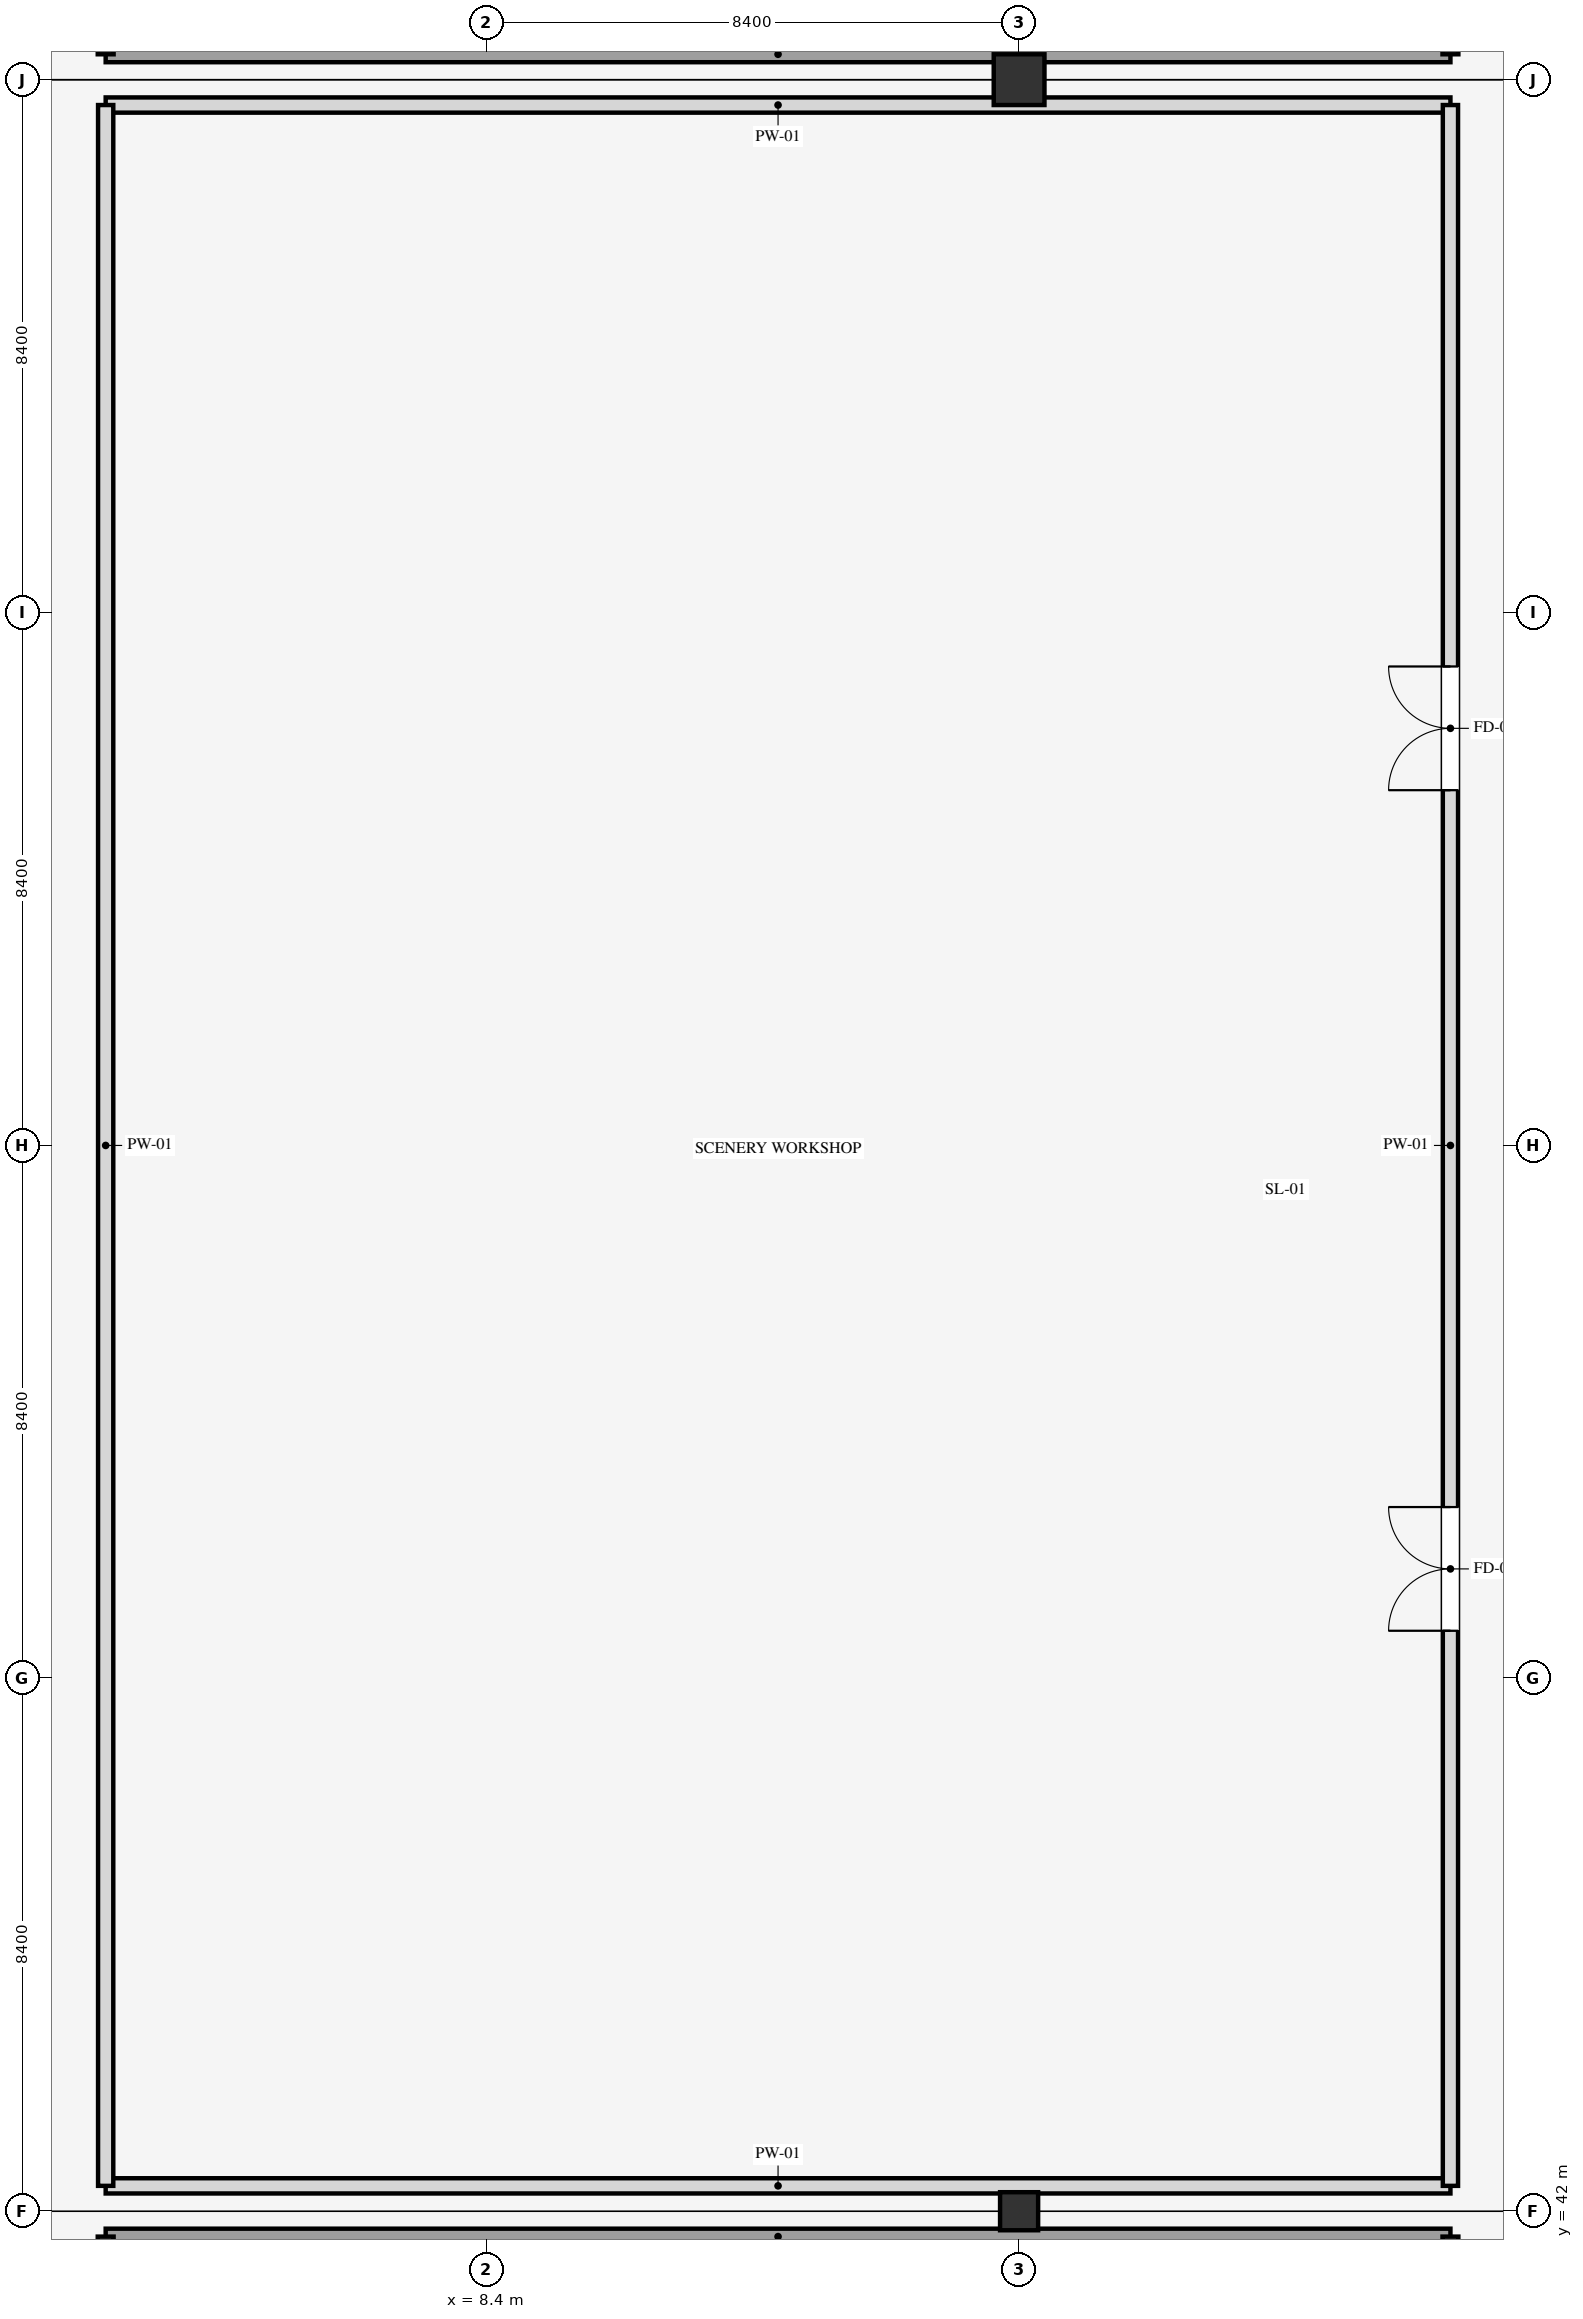
"""IFC4 building model, lengths in metres.
Left out: names, types, materials, properties, quantities, classifications, styles, units other than length and angle.
Written with IfcOpenShell. Run it as: python <this file> out.ifc"""

import sys

from ifc_helpers import new_model, si_unit, direction, frame, frame_2d, origin, origin_2d, place, context, subcontext, project, spatial, rectangle, extrude, element, fill, save


model = new_model("IFC4")
c1 = context("Model", 3, precision=1e-05, world=origin(), true_north=direction((0.0, 1.0)))
c2 = subcontext(c1, "Body", "Model", "MODEL_VIEW")
j1 = project(units=[si_unit("LENGTHUNIT", "METRE"), si_unit("PLANEANGLEUNIT", "RADIAN")], contexts=[c1])
p1 = place(None, origin())
s1 = spatial("IfcSite", under=j1, at=p1, CompositionType="ELEMENT")
p2 = place(p1, origin())
s2 = spatial("IfcBuilding", under=s1, at=p2, CompositionType="ELEMENT")
p3 = place(p2, origin())
s3 = spatial("IfcBuildingStorey", under=s2, at=p3, CompositionType="ELEMENT", Elevation=0.0)
p4 = place(p3, frame((16.8, 42.0, 0.0), z_axis=(0.0, 0.0, 1.0), x_axis=(1.0, 0.0, 0.0)))
e1 = element("IfcColumn", 1, at=p4, inside=s3, PredefinedType="COLUMN", context=c2, shape_type="SweptSolid", body=[
    extrude(rectangle(XDim=0.6, YDim=0.6, at=origin_2d()), origin(), (0.0, 0.0, 1.0), 5.4),
])
p5 = place(p3, frame((16.8, 75.6, 0.0), z_axis=(0.0, 0.0, 1.0), x_axis=(1.0, 0.0, 0.0)))
e2 = element("IfcColumn", 2, at=p5, inside=s3, PredefinedType="COLUMN", context=c2, shape_type="SweptSolid", body=[
    extrude(rectangle(XDim=0.8, YDim=0.8, at=origin_2d()), origin(), (0.0, 0.0, 1.0), 5.4),
])
for number, where, z_axis, x_axis in (
    (3, (2.4, 42.4, 0.0), (0.0, 0.0, 1.0), (1.0, 0.0, 0.0)),
    (4, (2.4, 75.2, 0.0), (0.0, 0.0, 1.0), (1.0, 0.0, 0.0)),
):
    element("IfcWall", number, at=place(p3, frame(where, z_axis=z_axis, x_axis=x_axis)), inside=s3, PredefinedType="PARTITIONING", context=c2, shape_type="SweptSolid", body=[
        extrude(rectangle(XDim=21.2, YDim=0.24, at=frame_2d((10.6, 0.0))), origin(), (0.0, 0.0, 1.0), 4.44),
    ])
p6 = place(p3, frame((2.4, 42.4, 0.0), z_axis=(0.0, 0.0, 1.0), x_axis=(0.0, 1.0, 0.0)))
e5 = element("IfcWall", 5, at=p6, inside=s3, PredefinedType="PARTITIONING", context=c2, shape_type="SweptSolid", body=[
    extrude(rectangle(XDim=32.8, YDim=0.24, at=frame_2d((16.4, 0.0))), origin(), (0.0, 0.0, 1.0), 4.44),
])
p7 = place(p3, frame((23.6, 42.4, 0.0), z_axis=(0.0, 0.0, 1.0), x_axis=(0.0, 1.0, 0.0)))
e6 = element("IfcWall", 6, at=p7, inside=s3, PredefinedType="PARTITIONING", context=c2, shape_type="SweptSolid", body=[
    extrude(rectangle(XDim=32.8, YDim=0.24, at=frame_2d((16.4, 0.0))), origin(), (0.0, 0.0, 1.0), 4.44),
])
p8 = place(p7, frame((8.75, 0.0, 0.0)))
e7 = element("IfcOpeningElement", 7, at=p8, cuts=e6, PredefinedType="OPENING", context=c2, shape_type="SweptSolid", body=[
    extrude(rectangle(XDim=1.95, YDim=2.3, at=frame_2d((0.975, 1.15))), frame((0.0, 0.13, 0.0), z_axis=(0.0, -1.0, 0.0), x_axis=(1.0, 0.0, 0.0)), (0.0, 0.0, 1.0), 0.26),
])
p9 = place(p7, frame((22.0, 0.0, 0.0)))
e8 = element("IfcOpeningElement", 8, at=p9, cuts=e6, PredefinedType="OPENING", context=c2, shape_type="SweptSolid", body=[
    extrude(rectangle(XDim=1.95, YDim=2.3, at=frame_2d((0.975, 1.15))), frame((0.0, 0.13, 0.0), z_axis=(0.0, -1.0, 0.0), x_axis=(1.0, 0.0, 0.0)), (0.0, 0.0, 1.0), 0.26),
])
p10 = place(p3, frame((2.4, 76.0, 0.0), z_axis=(0.0, 0.0, 1.0), x_axis=(1.0, 0.0, 0.0)))
e9 = element("IfcWall", 9, at=p10, inside=s3, PredefinedType="SHEAR", context=c2, shape_type="SweptSolid", body=[
    extrude(rectangle(XDim=21.2, YDim=0.25, at=frame_2d((10.6, 0.0))), origin(), (0.0, 0.0, 1.0), 5.14),
])
p11 = place(p3, frame((2.4, 76.0, 0.0), z_axis=(0.0, 0.0, 1.0), x_axis=(0.0, 1.0, 0.0)))
e10 = element("IfcWall", 10, at=p11, inside=s3, PredefinedType="SHEAR", context=c2, shape_type="SweptSolid", body=[
    extrude(rectangle(XDim=23.6, YDim=0.25, at=frame_2d((11.8, 0.0))), origin(), (0.0, 0.0, 1.0), 5.14),
])
p12 = place(p3, frame((23.6, 76.0, 0.0), z_axis=(0.0, 0.0, 1.0), x_axis=(0.0, 1.0, 0.0)))
e11 = element("IfcWall", 11, at=p12, inside=s3, PredefinedType="SHEAR", context=c2, shape_type="SweptSolid", body=[
    extrude(rectangle(XDim=23.6, YDim=0.25, at=frame_2d((11.8, 0.0))), origin(), (0.0, 0.0, 1.0), 5.14),
])
p13 = place(p12, frame((10.0, 0.0, 0.0)))
e12 = element("IfcOpeningElement", 12, at=p13, cuts=e11, PredefinedType="OPENING", context=c2, shape_type="SweptSolid", body=[
    extrude(rectangle(XDim=1.75, YDim=2.2, at=frame_2d((0.875, 1.1))), frame((0.0, 0.135, 0.0), z_axis=(0.0, -1.0, 0.0), x_axis=(1.0, 0.0, 0.0)), (0.0, 0.0, 1.0), 0.27),
])
p14 = place(p3, frame((2.4, 41.6, 0.0), z_axis=(0.0, 0.0, 1.0), x_axis=(1.0, 0.0, 0.0)))
e13 = element("IfcWall", 13, at=p14, inside=s3, PredefinedType="SHEAR", context=c2, shape_type="SweptSolid", body=[
    extrude(rectangle(XDim=21.2, YDim=0.25, at=frame_2d((10.6, 0.0))), origin(), (0.0, 0.0, 1.0), 5.14),
])
p15 = place(p3, frame((2.4, 17.4, 0.0), z_axis=(0.0, 0.0, 1.0), x_axis=(0.0, 1.0, 0.0)))
e14 = element("IfcWall", 14, at=p15, inside=s3, PredefinedType="SHEAR", context=c2, shape_type="SweptSolid", body=[
    extrude(rectangle(XDim=24.2, YDim=0.25, at=frame_2d((12.1, 0.0))), origin(), (0.0, 0.0, 1.0), 5.14),
])
p16 = place(p3, frame((23.6, 17.4, 0.0), z_axis=(0.0, 0.0, 1.0), x_axis=(0.0, 1.0, 0.0)))
e15 = element("IfcWall", 15, at=p16, inside=s3, PredefinedType="SHEAR", context=c2, shape_type="SweptSolid", body=[
    extrude(rectangle(XDim=24.2, YDim=0.25, at=frame_2d((12.1, 0.0))), origin(), (0.0, 0.0, 1.0), 5.14),
])
p17 = place(p16, frame((10.0, 0.0, 0.0)))
e16 = element("IfcOpeningElement", 16, at=p17, cuts=e15, PredefinedType="OPENING", context=c2, shape_type="SweptSolid", body=[
    extrude(rectangle(XDim=1.75, YDim=2.2, at=frame_2d((0.875, 1.1))), frame((0.0, 0.135, 0.0), z_axis=(0.0, -1.0, 0.0), x_axis=(1.0, 0.0, 0.0)), (0.0, 0.0, 1.0), 0.27),
])
p18 = place(p8, origin())
e17 = element("IfcDoor", 17, at=p18, inside=s3, OperationType="DOUBLE_DOOR_SINGLE_SWING", PredefinedType="DOOR", context=c2, shape_type="SweptSolid", body=[
    extrude(rectangle(XDim=1.95, YDim=2.3, at=frame_2d((0.975, 1.15))), frame((0.0, 0.025, 0.0), z_axis=(0.0, -1.0, 0.0), x_axis=(1.0, 0.0, 0.0)), (0.0, 0.0, 1.0), 0.05),
])
fill(e7, e17)
p19 = place(p9, origin())
e18 = element("IfcDoor", 18, at=p19, inside=s3, OperationType="DOUBLE_DOOR_SINGLE_SWING", PredefinedType="DOOR", context=c2, shape_type="SweptSolid", body=[
    extrude(rectangle(XDim=1.95, YDim=2.3, at=frame_2d((0.975, 1.15))), frame((0.0, 0.025, 0.0), z_axis=(0.0, -1.0, 0.0), x_axis=(1.0, 0.0, 0.0)), (0.0, 0.0, 1.0), 0.05),
])
fill(e8, e18)
save(model, sys.argv[1])
